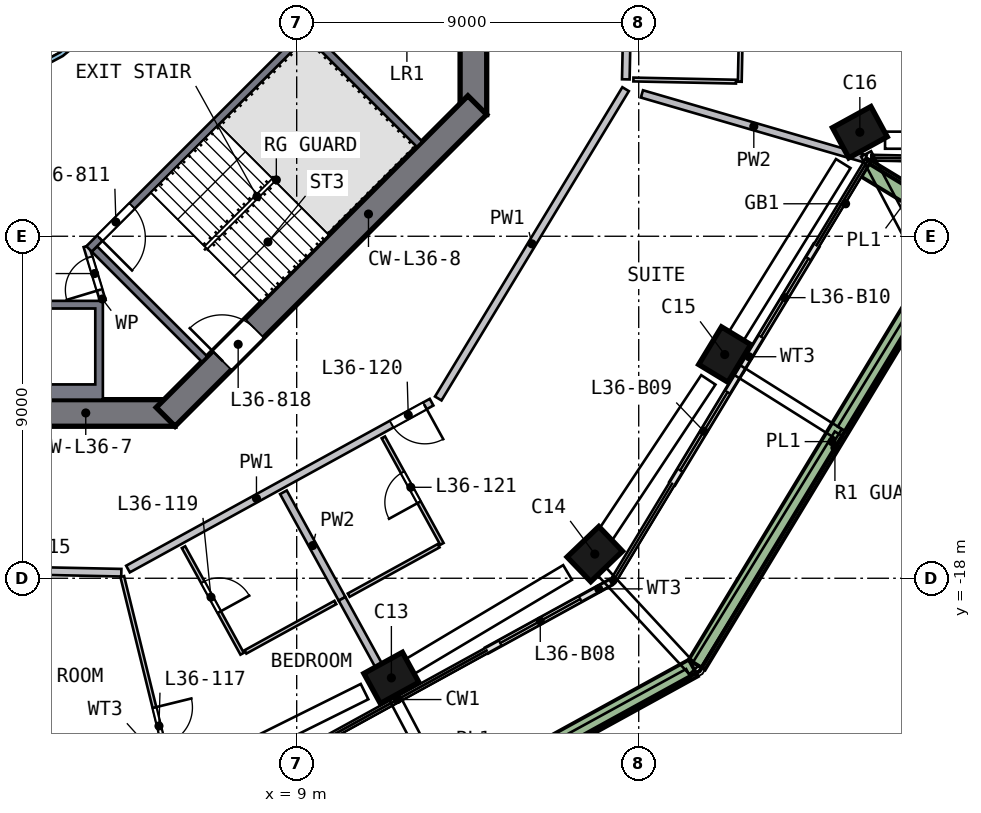
"""IFC4 building model, lengths in metres.
Left out: names, types, materials, properties, quantities, classifications, styles, units other than length and angle.
Written with IfcOpenShell. Run it as: python <this file> out.ifc"""

import sys

from ifc_helpers import new_model, si_unit, direction, frame, frame_2d, origin, origin_2d, place, context, subcontext, project, spatial, polyline, rectangle, outline, extrude, element, fill, save


model = new_model("IFC4")
c1 = context("Model", 3, precision=1e-05, world=origin(), true_north=direction((0.0, 1.0)))
c2 = subcontext(c1, "Body", "Model", "MODEL_VIEW")
j1 = project(units=[si_unit("LENGTHUNIT", "METRE"), si_unit("PLANEANGLEUNIT", "RADIAN")], contexts=[c1])
p1 = place(None, origin())
s1 = spatial("IfcSite", under=j1, at=p1, CompositionType="ELEMENT")
p2 = place(p1, origin())
s2 = spatial("IfcBuilding", under=s1, at=p2, CompositionType="ELEMENT")
p3 = place(p2, frame((0.0, 0.0, 150.5)))
s3 = spatial("IfcBuildingStorey", under=s2, at=p3, CompositionType="ELEMENT", Elevation=150.5)
p4 = place(p3, frame((11.373, -20.688, 0.0), z_axis=(0.098028295, 0.054908013, 0.993667733), x_axis=(0.871024775, 0.478217839, -0.112354524)))
e1 = element("IfcColumn", 1, at=p4, inside=s3, PredefinedType="COLUMN", context=c2, shape_type="SweptSolid", body=[
    extrude(rectangle(XDim=1.15, YDim=0.9, at=origin_2d()), origin(), (0.0, 0.0, 1.0), 3.21),
])
p5 = place(p3, frame((16.745, -17.461, 0.0), z_axis=(0.082336971, 0.080284249, 0.993365523), x_axis=(-0.717087466, -0.687431138, 0.114995638)))
e2 = element("IfcColumn", 2, at=p5, inside=s3, PredefinedType="COLUMN", context=c2, shape_type="SweptSolid", body=[
    extrude(rectangle(XDim=1.15, YDim=0.9, at=origin_2d()), origin(), (0.0, 0.0, 1.0), 3.211),
])
p6 = place(p3, frame((20.194, -12.23, 0.0), z_axis=(0.057418061, 0.096507973, 0.993674684), x_axis=(0.515299129, 0.849621729, -0.112293037)))
e3 = element("IfcColumn", 3, at=p6, inside=s3, PredefinedType="COLUMN", context=c2, shape_type="SweptSolid", body=[
    extrude(rectangle(XDim=1.15, YDim=0.9, at=origin_2d()), origin(), (0.0, 0.0, 1.0), 3.21),
])
p7 = place(p3, frame((23.783, -6.399, 0.0), z_axis=(0.029415142, 0.113328106, 0.993122092), x_axis=(-0.876529294, -0.474633129, 0.08012359)))
e4 = element("IfcColumn", 4, at=p7, inside=s3, PredefinedType="COLUMN", context=c2, shape_type="SweptSolid", body=[
    extrude(rectangle(XDim=1.15, YDim=0.9, at=origin_2d()), origin(), (0.0, 0.0, 1.0), 3.212),
])
p8 = place(p3, frame((13.65, -5.799, 0.0), z_axis=(0.0, 0.0, 1.0), x_axis=(0.0, 1.0, 0.0)))
e5 = element("IfcWall", 5, at=p8, inside=s3, PredefinedType="SHEAR", context=c2, shape_type="SweptSolid", body=[
    extrude(rectangle(XDim=11.598, YDim=0.7, at=frame_2d((5.799, 0.0))), origin(), (0.0, 0.0, 1.0), 3.5),
])
p9 = place(p8, frame((4.899, 0.0, 0.0)))
e6 = element("IfcOpeningElement", 6, at=p9, cuts=e5, PredefinedType="OPENING", context=c2, shape_type="SweptSolid", body=[
    extrude(rectangle(XDim=1.8, YDim=2.1, at=frame_2d((0.9, 1.05))), frame((0.0, 0.36, 0.0), z_axis=(0.0, -1.0, 0.0), x_axis=(1.0, 0.0, 0.0)), (0.0, 0.0, 1.0), 0.72),
])
p10 = place(p3, frame((-5.799, -13.65, 0.0), z_axis=(0.0, 0.0, 1.0), x_axis=(1.0, 0.0, 0.0)))
e7 = element("IfcWall", 7, at=p10, inside=s3, PredefinedType="SHEAR", context=c2, shape_type="SweptSolid", body=[
    extrude(rectangle(XDim=11.598, YDim=0.7, at=frame_2d((5.799, 0.0))), origin(), (0.0, 0.0, 1.0), 3.5),
])
p11 = place(p10, frame((4.899, 0.0, 0.0)))
e8 = element("IfcOpeningElement", 8, at=p11, cuts=e7, PredefinedType="OPENING", context=c2, shape_type="SweptSolid", body=[
    extrude(rectangle(XDim=1.8, YDim=2.1, at=frame_2d((0.9, 1.05))), frame((0.0, 0.36, 0.0), z_axis=(0.0, -1.0, 0.0), x_axis=(1.0, 0.0, 0.0)), (0.0, 0.0, 1.0), 0.72),
])
p12 = place(p3, frame((5.552, -13.752, 0.0), z_axis=(0.0, 0.0, 1.0), x_axis=(0.707106781, 0.707106781, 0.0)))
e9 = element("IfcWall", 9, at=p12, inside=s3, PredefinedType="SHEAR", context=c2, shape_type="SweptSolid", body=[
    extrude(rectangle(XDim=11.598, YDim=0.7, at=frame_2d((5.799, 0.0))), origin(), (0.0, 0.0, 1.0), 3.5),
])
p13 = place(p12, frame((2.099, 0.0, 0.0)))
e10 = element("IfcOpeningElement", 10, at=p13, cuts=e9, PredefinedType="OPENING", context=c2, shape_type="SweptSolid", body=[
    extrude(rectangle(XDim=1.2, YDim=2.1, at=frame_2d((0.6, 1.05))), frame((0.0, 0.36, 0.0), z_axis=(0.0, -1.0, 0.0), x_axis=(1.0, 0.0, 0.0)), (0.0, 0.0, 1.0), 0.72),
])
p14 = place(p3, frame((14.007, -19.896, 0.0), z_axis=(0.0, 0.0, 1.0), x_axis=(0.876308978, 0.481749495, 0.0)))
e11 = element("IfcWall", 11, at=p14, inside=s3, PredefinedType="SOLIDWALL", context=c2, shape_type="SweptSolid", body=[
    extrude(rectangle(XDim=3.71, YDim=0.15, at=frame_2d((1.855, 0.0))), origin(), (0.0, 0.0, 1.0), 2.475),
])
p15 = place(p14, frame((0.4, 0.0, 0.0)))
e12 = element("IfcOpeningElement", 12, at=p15, cuts=e11, PredefinedType="OPENING", context=c2, shape_type="SweptSolid", body=[
    extrude(rectangle(XDim=2.4, YDim=2.4, at=frame_2d((1.2, 1.2))), frame((0.0, 0.085, 0.0), z_axis=(0.0, -1.0, 0.0), x_axis=(1.0, 0.0, 0.0)), (0.0, 0.0, 1.0), 0.17),
])
p16 = place(p3, frame((18.885, -15.5, 0.0), z_axis=(0.0, 0.0, 1.0), x_axis=(0.518004284, 0.855378023, 0.0)))
e13 = element("IfcWall", 13, at=p16, inside=s3, PredefinedType="SOLIDWALL", context=c2, shape_type="SweptSolid", body=[
    extrude(rectangle(XDim=3.475, YDim=0.15, at=frame_2d((1.737, 0.0))), origin(), (0.0, 0.0, 1.0), 2.475),
])
p17 = place(p16, frame((0.4, 0.0, 0.0)))
e14 = element("IfcOpeningElement", 14, at=p17, cuts=e13, PredefinedType="OPENING", context=c2, shape_type="SweptSolid", body=[
    extrude(rectangle(XDim=2.4, YDim=2.4, at=frame_2d((1.2, 1.2))), frame((0.0, 0.085, 0.0), z_axis=(0.0, -1.0, 0.0), x_axis=(1.0, 0.0, 0.0)), (0.0, 0.0, 1.0), 0.17),
])
p18 = place(p3, frame((20.686, -12.528, 0.0), z_axis=(0.0, 0.0, 1.0), x_axis=(0.518011078, 0.855373908, 0.0)))
e15 = element("IfcWall", 15, at=p18, inside=s3, PredefinedType="SOLIDWALL", context=c2, shape_type="SweptSolid", body=[
    extrude(rectangle(XDim=3.835, YDim=0.15, at=frame_2d((1.918, 0.0))), origin(), (0.0, 0.0, 1.0), 2.475),
])
p19 = place(p18, frame((1.035, 0.0, 0.0)))
e16 = element("IfcOpeningElement", 16, at=p19, cuts=e15, PredefinedType="OPENING", context=c2, shape_type="SweptSolid", body=[
    extrude(rectangle(XDim=2.4, YDim=2.4, at=frame_2d((1.2, 1.2))), frame((0.0, 0.085, 0.0), z_axis=(0.0, -1.0, 0.0), x_axis=(1.0, 0.0, 0.0)), (0.0, 0.0, 1.0), 0.17),
])
p20 = place(p3, frame((7.85, -26.733, 0.0), z_axis=(0.0, 0.0, 1.0), x_axis=(0.87630321, 0.481759986, 0.0)))
e17 = element("IfcWall", 17, at=p20, inside=s3, PredefinedType="SOLIDWALL", context=c2, shape_type="SweptSolid", body=[
    extrude(rectangle(XDim=13.224, YDim=0.5, at=frame_2d((6.612, 0.0))), origin(), (0.0, 0.0, 1.0), 0.7),
])
p21 = place(p3, frame((19.531, -20.273, 0.0), z_axis=(0.0, 0.0, 1.0), x_axis=(0.518020576, 0.855368156, 0.0)))
e18 = element("IfcWall", 18, at=p21, inside=s3, PredefinedType="SOLIDWALL", context=c2, shape_type="SweptSolid", body=[
    extrude(rectangle(XDim=13.724, YDim=0.5, at=frame_2d((6.862, 0.0))), origin(), (0.0, 0.0, 1.0), 0.7),
])
p22 = place(p3, frame((26.297, -8.619, 0.0), z_axis=(0.0, 0.0, 1.0), x_axis=(-0.855354527, 0.518043081, 0.0)))
e19 = element("IfcWall", 19, at=p22, inside=s3, PredefinedType="SOLIDWALL", context=c2, shape_type="SweptSolid", body=[
    extrude(rectangle(XDim=2.699, YDim=0.5, at=frame_2d((1.35, 0.0))), origin(), (0.0, 0.0, 1.0), 0.7),
])
p23 = place(p3, origin())
e20 = element("IfcWall", 20, at=p23, inside=s3, PredefinedType="SOLIDWALL", context=c2, shape_type="SweptSolid", body=[
    extrude(outline(polyline([(3.9, -10.7), (3.9, -13.3), (1.2, -13.3), (1.2, -10.7), (3.9, -10.7)]), holes=[polyline([(1.4, -12.9), (3.7, -12.9), (3.7, -10.9), (1.4, -10.9), (1.4, -12.9)])]), origin(), (0.0, 0.0, 1.0), 3.19),
])
p24 = place(p3, frame((9.334, -3.535, 0.0), z_axis=(0.0, 0.0, 1.0), x_axis=(-0.707106781, -0.707106781, 0.0)))
e21 = element("IfcWall", 21, at=p24, inside=s3, PredefinedType="SOLIDWALL", context=c2, shape_type="SweptSolid", body=[
    extrude(rectangle(XDim=8.2, YDim=0.2, at=frame_2d((4.1, 0.0))), origin(), (0.0, 0.0, 1.0), 3.19),
])
p25 = place(p24, frame((6.6, 0.0, 0.0)))
e22 = element("IfcOpeningElement", 22, at=p25, cuts=e21, PredefinedType="OPENING", context=c2, shape_type="SweptSolid", body=[
    extrude(rectangle(XDim=1.2, YDim=2.1, at=frame_2d((0.6, 1.05))), frame((0.0, 0.11, 0.0), z_axis=(0.0, -1.0, 0.0), x_axis=(1.0, 0.0, 0.0)), (0.0, 0.0, 1.0), 0.22),
])
for number, where, z_axis, x_axis in (
    (23, (3.677, -9.334, 0.0), (0.0, 0.0, 1.0), (0.707, -0.707, 0.0)),
    (24, (9.334, -3.677, 0.0), (0.0, 0.0, 1.0), (0.707, -0.707, 0.0)),
):
    element("IfcWall", number, at=place(p3, frame(where, z_axis=z_axis, x_axis=x_axis)), inside=s3, PredefinedType="SOLIDWALL", context=c2, shape_type="SweptSolid", body=[
        extrude(rectangle(XDim=4.1, YDim=0.2, at=frame_2d((2.05, 0.0))), origin(), (0.0, 0.0, 1.0), 3.19),
    ])
p26 = place(p3, frame((3.9, -10.7, 0.0), z_axis=(0.0, 0.0, 1.0), x_axis=(-0.289808785, 0.957084567, 0.0)))
e25 = element("IfcWall", 25, at=p26, inside=s3, PredefinedType="PARTITIONING", context=c2, shape_type="SweptSolid", body=[
    extrude(rectangle(XDim=1.501, YDim=0.15, at=frame_2d((0.75, 0.0))), origin(), (0.0, 0.0, 1.0), 3.19),
])
p27 = place(p26, frame((0.301, 0.0, 0.0)))
e26 = element("IfcOpeningElement", 26, at=p27, cuts=e25, PredefinedType="OPENING", context=c2, shape_type="SweptSolid", body=[
    extrude(rectangle(XDim=0.9, YDim=2.1, at=frame_2d((0.45, 1.05))), frame((0.0, 0.085, 0.0), z_axis=(0.0, -1.0, 0.0), x_axis=(1.0, 0.0, 0.0)), (0.0, 0.0, 1.0), 0.17),
])
p28 = place(p3, origin())
e27 = element("IfcWall", 27, at=p28, inside=s3, PredefinedType="SOLIDWALL", context=c2, shape_type="SweptSolid", body=[
    extrude(outline(polyline([(5.021, -0.999), (4.73, -1.959), (4.257, -2.844), (3.62, -3.62), (2.844, -4.257), (1.959, -4.73), (0.999, -5.021), (0.0, -5.12), (-0.999, -5.021), (-1.959, -4.73), (-2.844, -4.257), (-3.62, -3.62), (-4.257, -2.844), (-4.73, -1.959), (-5.021, -0.999), (-5.12, 0.0), (-5.021, 0.999), (-4.73, 1.959), (-4.257, 2.844), (-3.62, 3.62), (-2.844, 4.257), (-1.959, 4.73), (-0.999, 5.021), (0.0, 5.12), (0.999, 5.021), (1.959, 4.73), (2.844, 4.257), (3.62, 3.62), (4.257, 2.844), (4.73, 1.959), (5.021, 0.999), (5.12, 0.0), (5.021, -0.999)]), holes=[polyline([(4.904, 0.976), (4.619, 1.913), (4.157, 2.778), (3.535, 3.535), (2.778, 4.157), (1.913, 4.619), (0.976, 4.904), (0.0, 5.0), (-0.976, 4.904), (-1.913, 4.619), (-2.778, 4.157), (-3.535, 3.535), (-4.157, 2.778), (-4.619, 1.913), (-4.904, 0.976), (-5.0, 0.0), (-4.904, -0.976), (-4.619, -1.913), (-4.157, -2.778), (-3.535, -3.535), (-2.778, -4.157), (-1.913, -4.619), (-0.976, -4.904), (0.0, -5.0), (0.976, -4.904), (1.913, -4.619), (2.778, -4.157), (3.535, -3.535), (4.157, -2.778), (4.619, -1.913), (4.904, -0.976), (5.0, 0.0), (4.904, 0.976)])]), origin(), (0.0, 0.0, 1.0), 3.19),
])
p29 = place(p3, frame((4.385, -17.854, 0.0), z_axis=(0.0, 0.0, 1.0), x_axis=(-0.99978087, 0.020933521, 0.0)))
e28 = element("IfcWall", 28, at=p29, inside=s3, PredefinedType="SOLIDWALL", context=c2, shape_type="SweptSolid", body=[
    extrude(rectangle(XDim=9.517, YDim=0.2, at=frame_2d((4.758, 0.0))), origin(), (0.0, 0.0, 1.0), 3.19),
])
p30 = place(p29, frame((1.9, 0.0, 0.0)))
e29 = element("IfcOpeningElement", 29, at=p30, cuts=e28, PredefinedType="OPENING", context=c2, shape_type="SweptSolid", body=[
    extrude(rectangle(XDim=1.0, YDim=2.1, at=frame_2d((0.5, 1.05))), frame((0.0, 0.11, 0.0), z_axis=(0.0, -1.0, 0.0), x_axis=(1.0, 0.0, 0.0)), (0.0, 0.0, 1.0), 0.22),
])
p31 = place(p3, frame((12.549, -13.366, 0.0), z_axis=(0.0, 0.0, 1.0), x_axis=(-0.876307491, -0.481752199, 0.0)))
e30 = element("IfcWall", 30, at=p31, inside=s3, PredefinedType="SOLIDWALL", context=c2, shape_type="SweptSolid", body=[
    extrude(rectangle(XDim=9.116, YDim=0.2, at=frame_2d((4.558, 0.0))), origin(), (0.0, 0.0, 1.0), 3.19),
])
p32 = place(p31, frame((0.2, 0.0, 0.0)))
e31 = element("IfcOpeningElement", 31, at=p32, cuts=e30, PredefinedType="OPENING", context=c2, shape_type="SweptSolid", body=[
    extrude(rectangle(XDim=1.0, YDim=2.1, at=frame_2d((0.5, 1.05))), frame((0.0, 0.11, 0.0), z_axis=(0.0, -1.0, 0.0), x_axis=(1.0, 0.0, 0.0)), (0.0, 0.0, 1.0), 0.22),
])
p33 = place(p3, frame((12.725, -13.269, 0.0), z_axis=(0.0, 0.0, 1.0), x_axis=(0.518037864, 0.855357686, 0.0)))
e32 = element("IfcWall", 32, at=p33, inside=s3, PredefinedType="SOLIDWALL", context=c2, shape_type="SweptSolid", body=[
    extrude(rectangle(XDim=9.516, YDim=0.2, at=frame_2d((4.758, 0.0))), origin(), (0.0, 0.0, 1.0), 3.19),
])
p34 = place(p3, frame((17.66, -4.871, 0.0), z_axis=(0.0, 0.0, 1.0), x_axis=(0.020967881, 0.99978015, 0.0)))
e33 = element("IfcWall", 33, at=p34, inside=s3, PredefinedType="SOLIDWALL", context=c2, shape_type="SweptSolid", body=[
    extrude(rectangle(XDim=3.4, YDim=0.2, at=frame_2d((1.7, 0.0))), origin(), (0.0, 0.0, 1.0), 3.19),
])
p35 = place(p3, frame((8.652, -15.737, 0.0), z_axis=(0.0, 0.0, 1.0), x_axis=(0.481725438, -0.876322202, 0.0)))
e34 = element("IfcWall", 34, at=p35, inside=s3, PredefinedType="SOLIDWALL", context=c2, shape_type="SweptSolid", body=[
    extrude(rectangle(XDim=3.2, YDim=0.2, at=frame_2d((1.6, 0.0))), origin(), (0.0, 0.0, 1.0), 3.19),
])
p36 = place(p3, frame((10.193, -18.541, 0.0), z_axis=(0.0, 0.0, 1.0), x_axis=(0.481766242, -0.876299771, 0.0)))
e35 = element("IfcWall", 35, at=p36, inside=s3, PredefinedType="SOLIDWALL", context=c2, shape_type="SweptSolid", body=[
    extrude(rectangle(XDim=2.95, YDim=0.2, at=frame_2d((1.475, 0.0))), origin(), (0.0, 0.0, 1.0), 3.19),
])
p37 = place(p3, frame((18.084, -5.254, 0.0), z_axis=(0.0, 0.0, 1.0), x_axis=(0.960299102, -0.278972463, 0.0)))
e36 = element("IfcWall", 36, at=p37, inside=s3, PredefinedType="SOLIDWALL", context=c2, shape_type="SweptSolid", body=[
    extrude(rectangle(XDim=6.132, YDim=0.2, at=frame_2d((3.066, 0.0))), origin(), (0.0, 0.0, 1.0), 3.19),
])
p38 = place(p3, frame((4.41, -17.955, 0.0), z_axis=(0.0, 0.0, 1.0), x_axis=(0.238532845, -0.97113443, 0.0)))
e37 = element("IfcWall", 37, at=p38, inside=s3, PredefinedType="PARTITIONING", context=c2, shape_type="SweptSolid", body=[
    extrude(rectangle(XDim=6.476, YDim=0.1, at=frame_2d((3.238, 0.0))), origin(), (0.0, 0.0, 1.0), 3.19),
])
p39 = place(p38, frame((3.55, 0.0, 0.0)))
e38 = element("IfcOpeningElement", 38, at=p39, cuts=e37, PredefinedType="OPENING", context=c2, shape_type="SweptSolid", body=[
    extrude(rectangle(XDim=1.0, YDim=2.1, at=frame_2d((0.5, 1.05))), frame((0.0, 0.06, 0.0), z_axis=(0.0, -1.0, 0.0), x_axis=(1.0, 0.0, 0.0)), (0.0, 0.0, 1.0), 0.12),
])
p40 = place(p3, frame((6.023, -17.182, 0.0), z_axis=(0.0, 0.0, 1.0), x_axis=(0.481757648, -0.876304495, 0.0)))
e39 = element("IfcWall", 39, at=p40, inside=s3, PredefinedType="PARTITIONING", context=c2, shape_type="SweptSolid", body=[
    extrude(rectangle(XDim=3.2, YDim=0.1, at=frame_2d((1.6, 0.0))), origin(), (0.0, 0.0, 1.0), 3.19),
])
p41 = place(p40, frame((1.05, 0.0, 0.0)))
e40 = element("IfcOpeningElement", 40, at=p41, cuts=e39, PredefinedType="OPENING", context=c2, shape_type="SweptSolid", body=[
    extrude(rectangle(XDim=0.9, YDim=2.1, at=frame_2d((0.45, 1.05))), frame((0.0, 0.06, 0.0), z_axis=(0.0, -1.0, 0.0), x_axis=(1.0, 0.0, 0.0)), (0.0, 0.0, 1.0), 0.12),
])
for number, where, z_axis, x_axis in (
    (41, (7.652, -19.938, 0.0), (0.0, 0.0, 1.0), (0.876, 0.482, 0.0)),
    (42, (12.734, -17.144, 0.0), (0.0, 0.0, 1.0), (-0.876, -0.482, 0.0)),
):
    element("IfcWall", number, at=place(p3, frame(where, z_axis=z_axis, x_axis=x_axis)), inside=s3, PredefinedType="PARTITIONING", context=c2, shape_type="SweptSolid", body=[
        extrude(rectangle(XDim=2.7, YDim=0.1, at=frame_2d((1.35, 0.0))), origin(), (0.0, 0.0, 1.0), 3.19),
    ])
p42 = place(p3, frame((12.822, -17.096, 0.0), z_axis=(0.0, 0.0, 1.0), x_axis=(-0.481725438, 0.876322202, 0.0)))
e43 = element("IfcWall", 43, at=p42, inside=s3, PredefinedType="PARTITIONING", context=c2, shape_type="SweptSolid", body=[
    extrude(rectangle(XDim=3.2, YDim=0.1, at=frame_2d((1.6, 0.0))), origin(), (0.0, 0.0, 1.0), 3.19),
])
p43 = place(p42, frame((1.25, 0.0, 0.0)))
e44 = element("IfcOpeningElement", 44, at=p43, cuts=e43, PredefinedType="OPENING", context=c2, shape_type="SweptSolid", body=[
    extrude(rectangle(XDim=0.9, YDim=2.1, at=frame_2d((0.45, 1.05))), frame((0.0, 0.06, 0.0), z_axis=(0.0, -1.0, 0.0), x_axis=(1.0, 0.0, 0.0)), (0.0, 0.0, 1.0), 0.12),
])
p44 = place(p3, frame((17.86, -4.875, 0.0), z_axis=(0.0, 0.0, 1.0), x_axis=(0.999779947, -0.020977566, 0.0)))
e45 = element("IfcWall", 45, at=p44, inside=s3, PredefinedType="PARTITIONING", context=c2, shape_type="SweptSolid", body=[
    extrude(rectangle(XDim=2.7, YDim=0.1, at=frame_2d((1.35, 0.0))), origin(), (0.0, 0.0, 1.0), 3.19),
])
p45 = place(p3, frame((20.659, -4.934, 0.0), z_axis=(0.0, 0.0, 1.0), x_axis=(0.020981339, 0.999779867, 0.0)))
e46 = element("IfcWall", 46, at=p45, inside=s3, PredefinedType="PARTITIONING", context=c2, shape_type="SweptSolid", body=[
    extrude(rectangle(XDim=3.2, YDim=0.1, at=frame_2d((1.6, 0.0))), origin(), (0.0, 0.0, 1.0), 3.19),
])
p46 = place(p45, frame((1.25, 0.0, 0.0)))
e47 = element("IfcOpeningElement", 47, at=p46, cuts=e46, PredefinedType="OPENING", context=c2, shape_type="SweptSolid", body=[
    extrude(rectangle(XDim=0.9, YDim=2.1, at=frame_2d((0.45, 1.05))), frame((0.0, 0.06, 0.0), z_axis=(0.0, -1.0, 0.0), x_axis=(1.0, 0.0, 0.0)), (0.0, 0.0, 1.0), 0.12),
])
p47 = place(p15, origin())
e48 = element("IfcDoor", 48, at=p47, inside=s3, OperationType="SLIDING_TO_RIGHT", PredefinedType="DOOR", context=c2, shape_type="SweptSolid", body=[
    extrude(rectangle(XDim=2.4, YDim=2.4, at=frame_2d((1.2, 1.2))), frame((0.0, 0.025, 0.0), z_axis=(0.0, -1.0, 0.0), x_axis=(1.0, 0.0, 0.0)), (0.0, 0.0, 1.0), 0.05),
])
fill(e12, e48)
p48 = place(p17, origin())
e49 = element("IfcDoor", 49, at=p48, inside=s3, OperationType="SLIDING_TO_RIGHT", PredefinedType="DOOR", context=c2, shape_type="SweptSolid", body=[
    extrude(rectangle(XDim=2.4, YDim=2.4, at=frame_2d((1.2, 1.2))), frame((0.0, 0.025, 0.0), z_axis=(0.0, -1.0, 0.0), x_axis=(1.0, 0.0, 0.0)), (0.0, 0.0, 1.0), 0.05),
])
fill(e14, e49)
p49 = place(p19, origin())
e50 = element("IfcDoor", 50, at=p49, inside=s3, OperationType="SLIDING_TO_LEFT", PredefinedType="DOOR", context=c2, shape_type="SweptSolid", body=[
    extrude(rectangle(XDim=2.4, YDim=2.4, at=frame_2d((1.2, 1.2))), frame((0.0, 0.025, 0.0), z_axis=(0.0, -1.0, 0.0), x_axis=(1.0, 0.0, 0.0)), (0.0, 0.0, 1.0), 0.05),
])
fill(e16, e50)
p50 = place(p25, origin())
e51 = element("IfcDoor", 51, at=p50, inside=s3, OperationType="SINGLE_SWING_RIGHT", PredefinedType="DOOR", context=c2, shape_type="SweptSolid", body=[
    extrude(rectangle(XDim=1.2, YDim=2.1, at=frame_2d((0.6, 1.05))), frame((0.0, 0.025, 0.0), z_axis=(0.0, -1.0, 0.0), x_axis=(1.0, 0.0, 0.0)), (0.0, 0.0, 1.0), 0.05),
])
fill(e22, e51)
p51 = place(p13, origin())
e52 = element("IfcDoor", 52, at=p51, inside=s3, OperationType="SINGLE_SWING_LEFT", PredefinedType="DOOR", context=c2, shape_type="SweptSolid", body=[
    extrude(rectangle(XDim=1.2, YDim=2.1, at=frame_2d((0.6, 1.05))), frame((0.0, 0.025, 0.0), z_axis=(0.0, -1.0, 0.0), x_axis=(1.0, 0.0, 0.0)), (0.0, 0.0, 1.0), 0.05),
])
fill(e10, e52)
p52 = place(p27, origin())
e53 = element("IfcDoor", 53, at=p52, inside=s3, OperationType="SINGLE_SWING_LEFT", PredefinedType="DOOR", context=c2, shape_type="SweptSolid", body=[
    extrude(rectangle(XDim=0.9, YDim=2.1, at=frame_2d((0.45, 1.05))), frame((0.0, 0.025, 0.0), z_axis=(0.0, -1.0, 0.0), x_axis=(1.0, 0.0, 0.0)), (0.0, 0.0, 1.0), 0.05),
])
fill(e26, e53)
p53 = place(p39, origin())
e54 = element("IfcDoor", 54, at=p53, inside=s3, OperationType="SINGLE_SWING_LEFT", PredefinedType="DOOR", context=c2, shape_type="SweptSolid", body=[
    extrude(rectangle(XDim=1.0, YDim=2.1, at=frame_2d((0.5, 1.05))), frame((0.0, 0.025, 0.0), z_axis=(0.0, -1.0, 0.0), x_axis=(1.0, 0.0, 0.0)), (0.0, 0.0, 1.0), 0.05),
])
fill(e38, e54)
p54 = place(p41, origin())
e55 = element("IfcDoor", 55, at=p54, inside=s3, OperationType="SINGLE_SWING_RIGHT", PredefinedType="DOOR", context=c2, shape_type="SweptSolid", body=[
    extrude(rectangle(XDim=0.9, YDim=2.1, at=frame_2d((0.45, 1.05))), frame((0.0, 0.025, 0.0), z_axis=(0.0, -1.0, 0.0), x_axis=(1.0, 0.0, 0.0)), (0.0, 0.0, 1.0), 0.05),
])
fill(e40, e55)
p55 = place(p32, origin())
e56 = element("IfcDoor", 56, at=p55, inside=s3, OperationType="SINGLE_SWING_LEFT", PredefinedType="DOOR", context=c2, shape_type="SweptSolid", body=[
    extrude(rectangle(XDim=1.0, YDim=2.1, at=frame_2d((0.5, 1.05))), frame((0.0, 0.025, 0.0), z_axis=(0.0, -1.0, 0.0), x_axis=(1.0, 0.0, 0.0)), (0.0, 0.0, 1.0), 0.05),
])
fill(e31, e56)
p56 = place(p43, origin())
e57 = element("IfcDoor", 57, at=p56, inside=s3, OperationType="SINGLE_SWING_LEFT", PredefinedType="DOOR", context=c2, shape_type="SweptSolid", body=[
    extrude(rectangle(XDim=0.9, YDim=2.1, at=frame_2d((0.45, 1.05))), frame((0.0, 0.025, 0.0), z_axis=(0.0, -1.0, 0.0), x_axis=(1.0, 0.0, 0.0)), (0.0, 0.0, 1.0), 0.05),
])
fill(e44, e57)
save(model, sys.argv[1])
